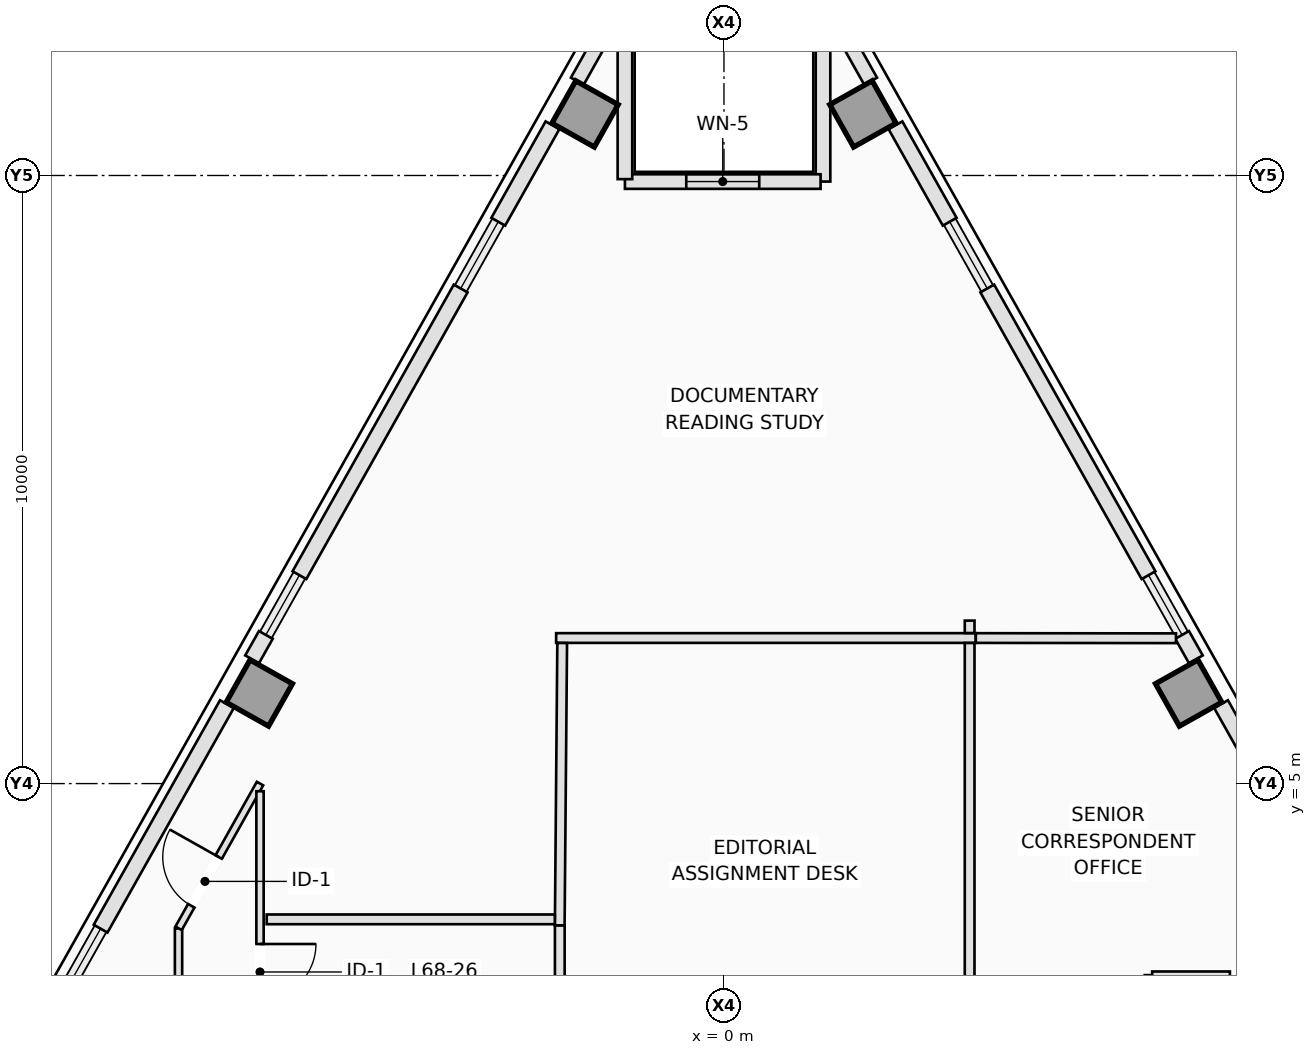
"""IFC4 building model, lengths in metres.
Left out: names, types, materials, properties, quantities, classifications, styles, units other than length and angle.
Written with IfcOpenShell. Run it as: python <this file> out.ifc"""

import sys

from ifc_helpers import new_model, si_unit, direction, frame, frame_2d, origin, origin_2d, place, context, subcontext, project, spatial, rectangle, extrude, element, fill, save


model = new_model("IFC4")
c1 = context("Model", 3, precision=1e-05, world=origin(), true_north=direction((0.0, 1.0)))
c2 = subcontext(c1, "Body", "Model", "MODEL_VIEW")
j1 = project(units=[si_unit("LENGTHUNIT", "METRE"), si_unit("PLANEANGLEUNIT", "RADIAN")], contexts=[c1])
p1 = place(None, origin())
s1 = spatial("IfcSite", under=j1, at=p1, CompositionType="ELEMENT")
p2 = place(p1, origin())
s2 = spatial("IfcBuilding", under=s1, at=p2, CompositionType="ELEMENT")
p3 = place(p2, frame((0.0, 0.0, 246.4)))
s3 = spatial("IfcBuildingStorey", under=s2, at=p3, CompositionType="ELEMENT", Elevation=246.4)
for number, where, z_axis, x_axis in (
    (1, (7.642, 6.489, 0.0), (0.0, 0.0, 1.0), (0.872, 0.49, 0.0)),
    (2, (2.285, 16.012, 0.0), (0.0, 0.0, 1.0), (0.872, 0.49, 0.0)),
    (3, (-2.285, 16.012, 0.0), (0.0, 0.0, 1.0), (-0.872, 0.49, 0.0)),
    (4, (-7.642, 6.489, 0.0), (0.0, 0.0, 1.0), (-0.872, 0.49, 0.0)),
):
    element("IfcColumn", number, at=place(p3, frame(where, z_axis=z_axis, x_axis=x_axis)), inside=s3, PredefinedType="COLUMN", context=c2, shape_type="SweptSolid", body=[
        extrude(rectangle(XDim=0.8, YDim=0.8, at=origin_2d()), origin(), (0.0, 0.0, 1.0), 3.5),
    ])
p4 = place(p3, frame((1.95, 17.373, 0.0), z_axis=(0.0, 0.0, 1.0), x_axis=(0.490199895283, -0.871610040479, 0.0)))
e5 = element("IfcWall", 5, at=p4, inside=s3, PredefinedType="STANDARD", context=c2, shape_type="SweptSolid", body=[
    extrude(rectangle(XDim=0.945, YDim=0.24, at=frame_2d((0.472, 0.0))), origin(), (0.0, 0.0, 1.0), 3.25),
])
p5 = place(p3, frame((2.82, 15.826, 0.0), z_axis=(0.0, 0.0, 1.0), x_axis=(0.490261239633, -0.871575537125, 0.0)))
e6 = element("IfcWall", 6, at=p5, inside=s3, PredefinedType="STANDARD", context=c2, shape_type="SweptSolid", body=[
    extrude(rectangle(XDim=1.82, YDim=0.26, at=frame_2d((0.91, 0.0))), origin(), (0.0, 0.0, 1.0), 3.25),
])
p6 = place(p3, frame((4.33, 13.142, 0.0), z_axis=(0.0, 0.0, 1.0), x_axis=(0.490265525523, -0.871573126297, 0.0)))
e7 = element("IfcWall", 7, at=p6, inside=s3, PredefinedType="STANDARD", context=c2, shape_type="SweptSolid", body=[
    extrude(rectangle(XDim=5.409, YDim=0.26, at=frame_2d((2.705, 0.0))), origin(), (0.0, 0.0, 1.0), 3.25),
])
p7 = place(p3, frame((7.534, 7.445, 0.0), z_axis=(0.0, 0.0, 1.0), x_axis=(0.490412424957, -0.871490478116, 0.0)))
e8 = element("IfcWall", 8, at=p7, inside=s3, PredefinedType="STANDARD", context=c2, shape_type="SweptSolid", body=[
    extrude(rectangle(XDim=0.46, YDim=0.26, at=frame_2d((0.23, 0.0))), origin(), (0.0, 0.0, 1.0), 3.25),
])
p8 = place(p3, frame((8.174, 6.307, 0.0), z_axis=(0.0, 0.0, 1.0), x_axis=(0.490269447258, -0.871570920284, 0.0)))
e9 = element("IfcWall", 9, at=p8, inside=s3, PredefinedType="STANDARD", context=c2, shape_type="SweptSolid", body=[
    extrude(rectangle(XDim=4.237, YDim=0.26, at=frame_2d((2.118, 0.0))), origin(), (0.0, 0.0, 1.0), 3.25),
])
p9 = place(p3, frame((-2.413, 16.549, 0.0), z_axis=(0.0, 0.0, 1.0), x_axis=(0.490199895283, 0.871610040479, 0.0)))
e10 = element("IfcWall", 10, at=p9, inside=s3, PredefinedType="STANDARD", context=c2, shape_type="SweptSolid", body=[
    extrude(rectangle(XDim=0.945, YDim=0.24, at=frame_2d((0.472, 0.0))), origin(), (0.0, 0.0, 1.0), 3.25),
])
p10 = place(p3, frame((-7.76, 7.044, 0.0), z_axis=(0.0, 0.0, 1.0), x_axis=(0.490412424957, 0.871490478116, 0.0)))
e11 = element("IfcWall", 11, at=p10, inside=s3, PredefinedType="STANDARD", context=c2, shape_type="SweptSolid", body=[
    extrude(rectangle(XDim=0.46, YDim=0.26, at=frame_2d((0.23, 0.0))), origin(), (0.0, 0.0, 1.0), 3.25),
])
p11 = place(p3, frame((-6.982, 8.427, 0.0), z_axis=(0.0, 0.0, 1.0), x_axis=(0.490265525523, 0.871573126297, 0.0)))
e12 = element("IfcWall", 12, at=p11, inside=s3, PredefinedType="STANDARD", context=c2, shape_type="SweptSolid", body=[
    extrude(rectangle(XDim=5.409, YDim=0.26, at=frame_2d((2.705, 0.0))), origin(), (0.0, 0.0, 1.0), 3.25),
])
p12 = place(p3, frame((-3.712, 14.24, 0.0), z_axis=(0.0, 0.0, 1.0), x_axis=(0.490261239633, 0.871575537125, 0.0)))
e13 = element("IfcWall", 13, at=p12, inside=s3, PredefinedType="STANDARD", context=c2, shape_type="SweptSolid", body=[
    extrude(rectangle(XDim=1.82, YDim=0.26, at=frame_2d((0.91, 0.0))), origin(), (0.0, 0.0, 1.0), 3.25),
])
p13 = place(p3, frame((-10.251, 2.615, 0.0), z_axis=(0.0, 0.0, 1.0), x_axis=(0.490269447258, 0.871570920284, 0.0)))
e14 = element("IfcWall", 14, at=p13, inside=s3, PredefinedType="STANDARD", context=c2, shape_type="SweptSolid", body=[
    extrude(rectangle(XDim=4.237, YDim=0.26, at=frame_2d((2.118, 0.0))), origin(), (0.0, 0.0, 1.0), 3.25),
])
p14 = place(p3, frame((1.629, 17.4, 0.0), z_axis=(0.0, 0.0, 1.0), x_axis=(0.0, -1.0, 0.0)))
e15 = element("IfcWall", 15, at=p14, inside=s3, PredefinedType="STANDARD", context=c2, shape_type="SweptSolid", body=[
    extrude(rectangle(XDim=2.5, YDim=0.24, at=frame_2d((1.25, 0.0))), origin(), (0.0, 0.0, 1.0), 3.25),
])
p15 = place(p3, frame((1.589, 14.9, 0.0), z_axis=(0.0, 0.0, 1.0), x_axis=(-1.0, 0.0, 0.0)))
e16 = element("IfcWall", 16, at=p15, inside=s3, PredefinedType="STANDARD", context=c2, shape_type="SweptSolid", body=[
    extrude(rectangle(XDim=3.218, YDim=0.24, at=frame_2d((1.609, 0.0))), origin(), (0.0, 0.0, 1.0), 3.25),
])
p16 = place(p15, frame((1.009, 0.0, 0.9)))
e17 = element("IfcOpeningElement", 17, at=p16, cuts=e16, PredefinedType="OPENING", context=c2, shape_type="SweptSolid", body=[
    extrude(rectangle(XDim=1.2, YDim=1.8, at=frame_2d((0.6, 0.9))), frame((0.0, 0.13, 0.0), z_axis=(0.0, -1.0, 0.0), x_axis=(1.0, 0.0, 0.0)), (0.0, 0.0, 1.0), 0.26),
])
p17 = place(p3, frame((-1.629, 14.94, 0.0), z_axis=(0.0, 0.0, 1.0), x_axis=(0.0, 1.0, 0.0)))
e18 = element("IfcWall", 18, at=p17, inside=s3, PredefinedType="STANDARD", context=c2, shape_type="SweptSolid", body=[
    extrude(rectangle(XDim=2.46, YDim=0.24, at=frame_2d((1.23, 0.0))), origin(), (0.0, 0.0, 1.0), 3.25),
])
p18 = place(p3, frame((-8.97, -2.668, 0.0), z_axis=(0.0, 0.0, 1.0), x_axis=(0.0, 1.0, 0.0)))
e19 = element("IfcWall", 19, at=p18, inside=s3, PredefinedType="PARTITIONING", context=c2, shape_type="SweptSolid", body=[
    extrude(rectangle(XDim=5.286, YDim=0.12, at=frame_2d((2.643, 0.0))), origin(), (0.0, 0.0, 1.0), 3.25),
])
p19 = place(p18, frame((2.791, 0.0, 0.0)))
e20 = element("IfcOpeningElement", 20, at=p19, cuts=e19, PredefinedType="OPENING", context=c2, shape_type="SweptSolid", body=[
    extrude(rectangle(XDim=0.92, YDim=2.12, at=frame_2d((0.46, 1.06))), frame((0.0, 0.07, 0.0), z_axis=(0.0, -1.0, 0.0), x_axis=(1.0, 0.0, 0.0)), (0.0, 0.0, 1.0), 0.14),
])
p20 = place(p3, frame((-8.969, 2.62, 0.0), z_axis=(0.0, 0.0, 1.0), x_axis=(0.490341880416, 0.871530171773, 0.0)))
e21 = element("IfcWall", 21, at=p20, inside=s3, PredefinedType="PARTITIONING", context=c2, shape_type="SweptSolid", body=[
    extrude(rectangle(XDim=2.731, YDim=0.12, at=frame_2d((1.365, 0.0))), origin(), (0.0, 0.0, 1.0), 3.25),
])
p21 = place(p20, frame((0.425, 0.0, 0.0)))
e22 = element("IfcOpeningElement", 22, at=p21, cuts=e21, PredefinedType="OPENING", context=c2, shape_type="SweptSolid", body=[
    extrude(rectangle(XDim=0.92, YDim=2.12, at=frame_2d((0.46, 1.06))), frame((0.0, 0.07, 0.0), z_axis=(0.0, -1.0, 0.0), x_axis=(1.0, 0.0, 0.0)), (0.0, 0.0, 1.0), 0.14),
])
p22 = place(p3, frame((-7.63, 4.874, 0.0), z_axis=(0.0, 0.0, 1.0), x_axis=(0.0, -1.0, 0.0)))
e23 = element("IfcWall", 23, at=p22, inside=s3, PredefinedType="PARTITIONING", context=c2, shape_type="SweptSolid", body=[
    extrude(rectangle(XDim=7.604, YDim=0.12, at=frame_2d((3.802, 0.0))), origin(), (0.0, 0.0, 1.0), 3.25),
])
p23 = place(p22, frame((2.512, 0.0, 0.0)))
e24 = element("IfcOpeningElement", 24, at=p23, cuts=e23, PredefinedType="OPENING", context=c2, shape_type="SweptSolid", body=[
    extrude(rectangle(XDim=0.92, YDim=2.12, at=frame_2d((0.46, 1.06))), frame((0.0, 0.07, 0.0), z_axis=(0.0, -1.0, 0.0), x_axis=(1.0, 0.0, 0.0)), (0.0, 0.0, 1.0), 0.14),
])
p24 = place(p3, frame((6.98, -2.668, 0.0), z_axis=(0.0, 0.0, 1.0), x_axis=(0.0, 1.0, 0.0)))
e25 = element("IfcWall", 25, at=p24, inside=s3, PredefinedType="PARTITIONING", context=c2, shape_type="SweptSolid", body=[
    extrude(rectangle(XDim=4.518, YDim=0.12, at=frame_2d((2.259, 0.0))), origin(), (0.0, 0.0, 1.0), 3.25),
])
p25 = place(p24, frame((2.608, 0.0, 0.0)))
e26 = element("IfcOpeningElement", 26, at=p25, cuts=e25, PredefinedType="OPENING", context=c2, shape_type="SweptSolid", body=[
    extrude(rectangle(XDim=0.92, YDim=2.12, at=frame_2d((0.46, 1.06))), frame((0.0, 0.07, 0.0), z_axis=(0.0, -1.0, 0.0), x_axis=(1.0, 0.0, 0.0)), (0.0, 0.0, 1.0), 0.14),
])
p26 = place(p3, frame((7.042, 1.85, 0.0), z_axis=(0.0, 0.0, 1.0), x_axis=(1.0, 0.0, 0.0)))
e27 = element("IfcWall", 27, at=p26, inside=s3, PredefinedType="PARTITIONING", context=c2, shape_type="SweptSolid", body=[
    extrude(rectangle(XDim=1.278, YDim=0.12, at=frame_2d((0.639, 0.0))), origin(), (0.0, 0.0, 1.0), 3.25),
])
p27 = place(p3, frame((4.14, 7.394, 0.0), z_axis=(0.0, 0.0, 1.0), x_axis=(-1.0, 0.0, 0.0)))
e28 = element("IfcWall", 28, at=p27, inside=s3, PredefinedType="PARTITIONING", context=c2, shape_type="SweptSolid", body=[
    extrude(rectangle(XDim=6.9, YDim=0.16, at=frame_2d((3.45, 0.0))), origin(), (0.0, 0.0, 1.0), 3.25),
])
p28 = place(p3, frame((-2.661, 7.312, 0.0), z_axis=(0.0, 0.0, 1.0), x_axis=(-0.008673840445, -0.999962381538, 0.0)))
e29 = element("IfcWall", 29, at=p28, inside=s3, PredefinedType="PARTITIONING", context=c2, shape_type="SweptSolid", body=[
    extrude(rectangle(XDim=4.644, YDim=0.16, at=frame_2d((2.322, 0.0))), origin(), (0.0, 0.0, 1.0), 3.25),
])
p29 = place(p3, frame((7.433, 7.39, 0.0), z_axis=(0.0, 0.0, 1.0), x_axis=(-0.999999460761, 0.001038498068, 0.0)))
e30 = element("IfcWall", 30, at=p29, inside=s3, PredefinedType="PARTITIONING", context=c2, shape_type="SweptSolid", body=[
    extrude(rectangle(XDim=3.291, YDim=0.16, at=frame_2d((1.646, 0.0))), origin(), (0.0, 0.0, 1.0), 3.25),
])
p30 = place(p3, frame((-2.782, 2.767, 0.0), z_axis=(0.0, 0.0, 1.0), x_axis=(-1.0, 0.0, 0.0)))
e31 = element("IfcWall", 31, at=p30, inside=s3, PredefinedType="PARTITIONING", context=c2, shape_type="SweptSolid", body=[
    extrude(rectangle(XDim=4.738, YDim=0.16, at=frame_2d((2.369, 0.0))), origin(), (0.0, 0.0, 1.0), 2.943),
])
p31 = place(p3, frame((4.04, 7.68, 0.0), z_axis=(0.0, 0.0, 1.0), x_axis=(0.0, -1.0, 0.0)))
e32 = element("IfcWall", 32, at=p31, inside=s3, PredefinedType="PARTITIONING", context=c2, shape_type="SweptSolid", body=[
    extrude(rectangle(XDim=0.204, YDim=0.16, at=frame_2d((0.102, 0.0))), origin(), (0.0, 0.0, 1.0), 3.25),
])
p32 = place(p3, frame((4.04, 7.312, 0.0), z_axis=(0.0, 0.0, 1.0), x_axis=(0.0, -1.0, 0.0)))
e33 = element("IfcWall", 33, at=p32, inside=s3, PredefinedType="PARTITIONING", context=c2, shape_type="SweptSolid", body=[
    extrude(rectangle(XDim=7.372, YDim=0.16, at=frame_2d((3.686, 0.0))), origin(), (0.0, 0.0, 1.0), 3.25),
])
p33 = place(p3, frame((-2.7, 0.895, 0.0), z_axis=(0.0, 0.0, 1.0), x_axis=(0.0, 1.0, 0.0)))
e34 = element("IfcWall", 34, at=p33, inside=s3, PredefinedType="PARTITIONING", context=c2, shape_type="SweptSolid", body=[
    extrude(rectangle(XDim=1.771, YDim=0.16, at=frame_2d((0.885, 0.0))), origin(), (0.0, 0.0, 1.0), 3.25),
])
p34 = place(p16, origin())
e35 = element("IfcWindow", 35, at=p34, inside=s3, PartitioningType="SINGLE_PANEL", PredefinedType="WINDOW", context=c2, shape_type="SweptSolid", body=[
    extrude(rectangle(XDim=1.2, YDim=1.8, at=frame_2d((0.6, 0.9))), frame((0.0, 0.03, 0.0), z_axis=(0.0, -1.0, 0.0), x_axis=(1.0, 0.0, 0.0)), (0.0, 0.0, 1.0), 0.06),
])
fill(e17, e35)
p35 = place(p21, origin())
e36 = element("IfcDoor", 36, at=p35, inside=s3, OperationType="SINGLE_SWING_RIGHT", PredefinedType="DOOR", context=c2, shape_type="SweptSolid", body=[
    extrude(rectangle(XDim=0.92, YDim=2.12, at=frame_2d((0.46, 1.06))), frame((0.0, 0.025, 0.0), z_axis=(0.0, -1.0, 0.0), x_axis=(1.0, 0.0, 0.0)), (0.0, 0.0, 1.0), 0.05),
])
fill(e22, e36)
p36 = place(p23, origin())
e37 = element("IfcDoor", 37, at=p36, inside=s3, OperationType="SINGLE_SWING_LEFT", PredefinedType="DOOR", context=c2, shape_type="SweptSolid", body=[
    extrude(rectangle(XDim=0.92, YDim=2.12, at=frame_2d((0.46, 1.06))), frame((0.0, 0.025, 0.0), z_axis=(0.0, -1.0, 0.0), x_axis=(1.0, 0.0, 0.0)), (0.0, 0.0, 1.0), 0.05),
])
fill(e24, e37)
save(model, sys.argv[1])
